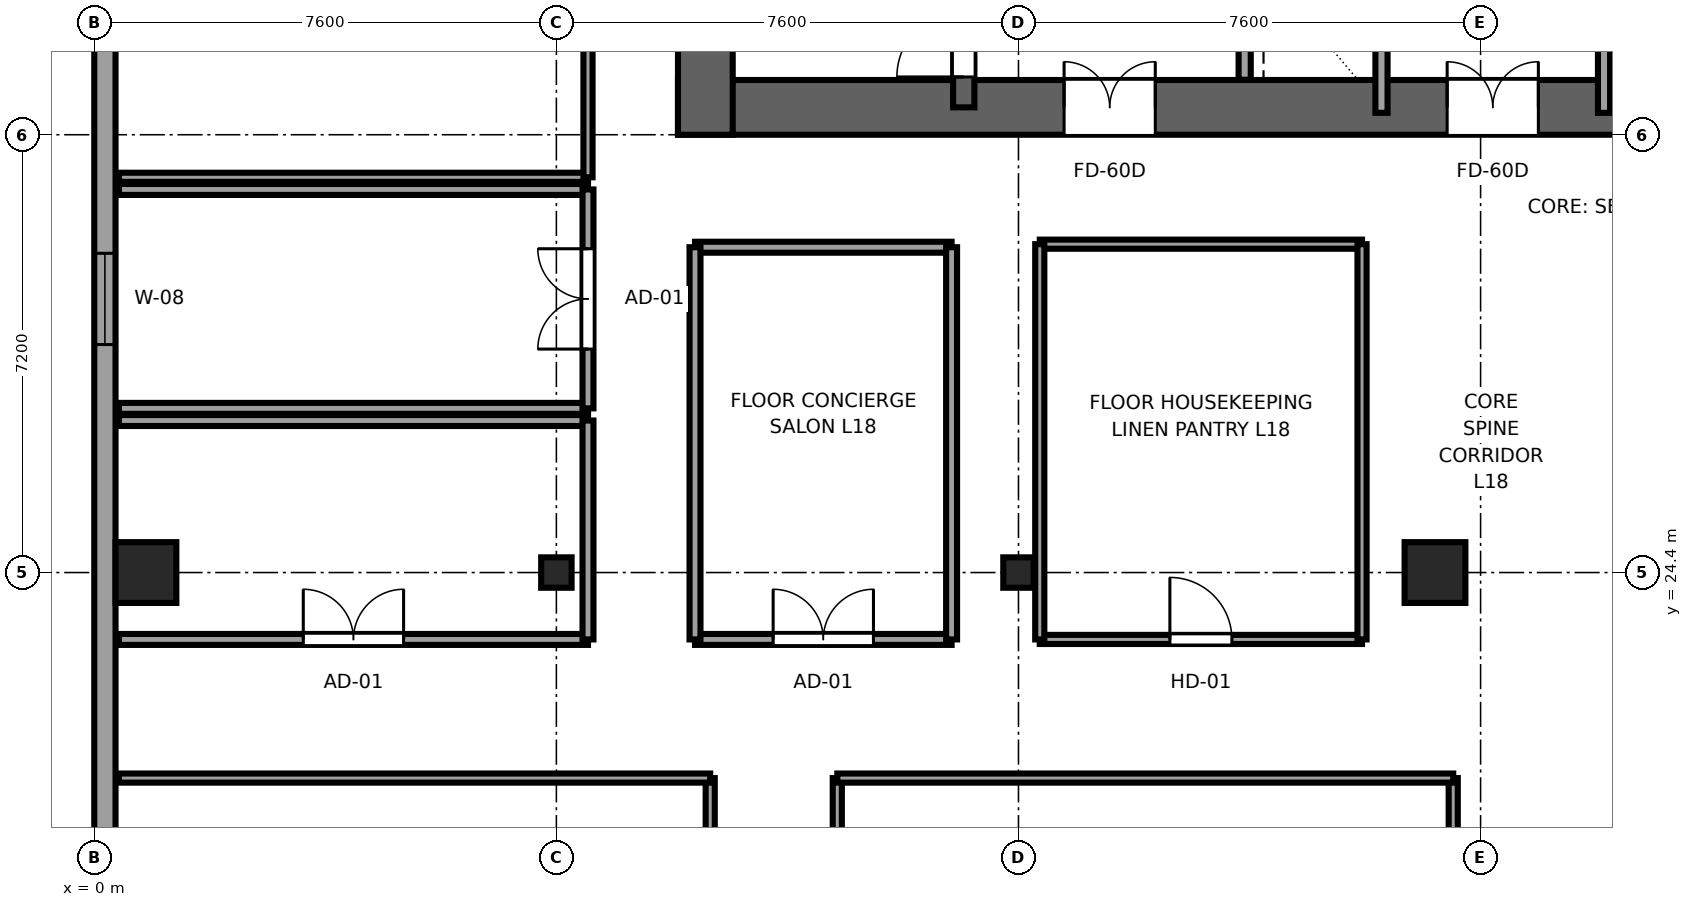
"""IFC4 building model, lengths in metres.
Left out: names, types, materials, properties, quantities, classifications, styles, units other than length and angle.
Written with IfcOpenShell. Run it as: python <this file> out.ifc"""

import sys

from ifc_helpers import new_model, si_unit, direction, frame, frame_2d, origin, origin_2d, place, context, subcontext, project, spatial, rectangle, i_section, extrude, source, transform, mapped, element, fill, save


model = new_model("IFC4")
c1 = context("Model", 3, precision=1e-05, world=origin(), true_north=direction((0.0, 1.0)))
c2 = subcontext(c1, "Body", "Model", "MODEL_VIEW")
j1 = project(units=[si_unit("LENGTHUNIT", "METRE"), si_unit("PLANEANGLEUNIT", "RADIAN")], contexts=[c1])
p1 = place(None, origin())
s1 = spatial("IfcSite", under=j1, at=p1, CompositionType="ELEMENT")
p2 = place(p1, origin())
s2 = spatial("IfcBuilding", under=s1, at=p2, CompositionType="ELEMENT")
p3 = place(p2, frame((0.0, 0.0, 74.6)))
s3 = spatial("IfcBuildingStorey", under=s2, at=p3, CompositionType="ELEMENT", Elevation=74.6)
p4 = place(p3, frame((9.6, 32.05, 0.0), z_axis=(0.0, 0.0, 1.0), x_axis=(1.0, 0.0, 0.0)))
e1 = element("IfcWall", 1, at=p4, inside=s3, PredefinedType="SHEAR", context=c2, shape_type="SweptSolid", body=[
    extrude(rectangle(XDim=26.8, YDim=0.9, at=frame_2d((13.4, 0.0))), origin(), (0.0, 0.0, 1.0), 3.55),
])
p5 = place(p4, frame((7.85, 0.0, 0.0), z_axis=(0.0, 0.0, 1.0), x_axis=(-1.0, 0.0, 0.0)))
e2 = element("IfcOpeningElement", 2, at=p5, cuts=e1, PredefinedType="OPENING", context=c2, shape_type="SweptSolid", body=[
    extrude(rectangle(XDim=1.5, YDim=2.04, at=frame_2d((0.75, 1.02))), frame((0.0, 0.46, 0.0), z_axis=(0.0, -1.0, 0.0), x_axis=(1.0, 0.0, 0.0)), (0.0, 0.0, 1.0), 0.92),
])
p6 = place(p4, frame((14.15, 0.0, 0.0), z_axis=(0.0, 0.0, 1.0), x_axis=(-1.0, 0.0, 0.0)))
e3 = element("IfcOpeningElement", 3, at=p6, cuts=e1, PredefinedType="OPENING", context=c2, shape_type="SweptSolid", body=[
    extrude(rectangle(XDim=1.5, YDim=2.04, at=frame_2d((0.75, 1.02))), frame((0.0, 0.46, 0.0), z_axis=(0.0, -1.0, 0.0), x_axis=(1.0, 0.0, 0.0)), (0.0, 0.0, 1.0), 0.92),
])
p7 = place(p4, frame((20.45, 0.0, 0.0), z_axis=(0.0, 0.0, 1.0), x_axis=(-1.0, 0.0, 0.0)))
e4 = element("IfcOpeningElement", 4, at=p7, cuts=e1, PredefinedType="OPENING", context=c2, shape_type="SweptSolid", body=[
    extrude(rectangle(XDim=1.5, YDim=2.04, at=frame_2d((0.75, 1.02))), frame((0.0, 0.46, 0.0), z_axis=(0.0, -1.0, 0.0), x_axis=(1.0, 0.0, 0.0)), (0.0, 0.0, 1.0), 0.92),
])
p8 = place(p3, frame((10.05, 31.6, 0.0), z_axis=(0.0, 0.0, 1.0), x_axis=(0.0, 1.0, 0.0)))
e5 = element("IfcWall", 5, at=p8, inside=s3, PredefinedType="SHEAR", context=c2, shape_type="SweptSolid", body=[
    extrude(rectangle(XDim=13.6, YDim=0.9, at=frame_2d((6.8, 0.0))), origin(), (0.0, 0.0, 1.0), 3.55),
])
p9 = place(p3, frame((14.3, 32.05, 0.0), z_axis=(0.0, 0.0, 1.0), x_axis=(0.0, 1.0, 0.0)))
e6 = element("IfcWall", 6, at=p9, inside=s3, PredefinedType="SHEAR", context=c2, shape_type="SweptSolid", body=[
    extrude(rectangle(XDim=12.7, YDim=0.35, at=frame_2d((6.35, 0.0))), origin(), (0.0, 0.0, 1.0), 3.55),
])
p10 = place(p9, frame((0.5, 0.0, 0.0)))
e7 = element("IfcOpeningElement", 7, at=p10, cuts=e6, PredefinedType="OPENING", context=c2, shape_type="SweptSolid", body=[
    extrude(rectangle(XDim=1.1, YDim=2.12, at=frame_2d((0.55, 1.06))), frame((0.0, 0.185, 0.0), z_axis=(0.0, -1.0, 0.0), x_axis=(1.0, 0.0, 0.0)), (0.0, 0.0, 1.0), 0.37),
])
m1 = source(origin(), c2, "Body", "SweptSolid", [
    extrude(rectangle(XDim=1.0, YDim=1.0, at=origin_2d()), origin(), (0.0, 0.0, 1.0), 3.55),
])
p11 = place(p3, frame((0.85, 24.4, 0.0), z_axis=(0.0, 0.0, 1.0), x_axis=(1.0, 0.0, 0.0)))
e8 = element("IfcColumn", 8, at=p11, inside=s3, PredefinedType="COLUMN", context=c2, shape_type="MappedRepresentation", body=[
    mapped(m1, transform((0.0, 0.0, 0.0), x_axis=(1.0, 0.0, 0.0), y_axis=(0.0, 1.0, 0.0), z_axis=(0.0, 0.0, 1.0), scale=1.0)),
])
m2 = source(origin(), c2, "Body", "SweptSolid", [
    extrude(i_section(OverallWidth=0.5, OverallDepth=0.5, WebThickness=0.028, FlangeThickness=0.045, at=origin_2d()), origin(), (0.0, 0.0, 1.0), 3.55),
])
for number, where, z_axis, x_axis in (
    (9, (7.6, 24.4, 0.0), (0.0, 0.0, 1.0), (1.0, 0.0, 0.0)),
    (10, (15.2, 24.4, 0.0), (0.0, 0.0, 1.0), (1.0, 0.0, 0.0)),
):
    element("IfcColumn", number, at=place(p3, frame(where, z_axis=z_axis, x_axis=x_axis)), inside=s3, PredefinedType="COLUMN", context=c2, shape_type="MappedRepresentation", body=[
        mapped(m2, transform((0.0, 0.0, 0.0), x_axis=(1.0, 0.0, 0.0), y_axis=(0.0, 1.0, 0.0), z_axis=(0.0, 0.0, 1.0), scale=1.0)),
    ])
p12 = place(p3, frame((22.05, 24.4, 0.0), z_axis=(0.0, 0.0, 1.0), x_axis=(1.0, 0.0, 0.0)))
e11 = element("IfcColumn", 11, at=p12, inside=s3, PredefinedType="COLUMN", context=c2, shape_type="MappedRepresentation", body=[
    mapped(m1, transform((0.0, 0.0, 0.0), x_axis=(1.0, 0.0, 0.0), y_axis=(0.0, 1.0, 0.0), z_axis=(0.0, 0.0, 1.0), scale=1.0)),
])
p13 = place(p3, frame((0.175, 41.383, 0.0), z_axis=(0.0, 0.0, 1.0), x_axis=(0.0, -1.0, 0.0)))
e12 = element("IfcWall", 12, at=p13, inside=s3, PredefinedType="SOLIDWALL", context=c2, shape_type="SweptSolid", body=[
    extrude(rectangle(XDim=36.766, YDim=0.35, at=frame_2d((18.383, 0.0))), origin(), (0.0, 0.0, 1.0), 3.37),
])
p14 = place(p13, frame((1.526, 0.0, 0.68)))
e13 = element("IfcOpeningElement", 13, at=p14, cuts=e12, PredefinedType="OPENING", context=c2, shape_type="SweptSolid", body=[
    extrude(rectangle(XDim=2.1, YDim=1.9, at=frame_2d((1.05, 0.95))), frame((0.0, 0.185, 0.0), z_axis=(0.0, -1.0, 0.0), x_axis=(1.0, 0.0, 0.0)), (0.0, 0.0, 1.0), 0.37),
])
p15 = place(p13, frame((4.428, 0.0, 0.68)))
e14 = element("IfcOpeningElement", 14, at=p15, cuts=e12, PredefinedType="OPENING", context=c2, shape_type="SweptSolid", body=[
    extrude(rectangle(XDim=2.1, YDim=1.9, at=frame_2d((1.05, 0.95))), frame((0.0, 0.185, 0.0), z_axis=(0.0, -1.0, 0.0), x_axis=(1.0, 0.0, 0.0)), (0.0, 0.0, 1.0), 0.37),
])
p16 = place(p13, frame((21.285, 0.0, 0.68)))
e15 = element("IfcOpeningElement", 15, at=p16, cuts=e12, PredefinedType="OPENING", context=c2, shape_type="SweptSolid", body=[
    extrude(rectangle(XDim=2.1, YDim=1.9, at=frame_2d((1.05, 0.95))), frame((0.0, 0.185, 0.0), z_axis=(0.0, -1.0, 0.0), x_axis=(1.0, 0.0, 0.0)), (0.0, 0.0, 1.0), 0.37),
])
p17 = place(p13, frame((26.286, 0.0, 0.68)))
e16 = element("IfcOpeningElement", 16, at=p17, cuts=e12, PredefinedType="OPENING", context=c2, shape_type="SweptSolid", body=[
    extrude(rectangle(XDim=2.1, YDim=1.9, at=frame_2d((1.05, 0.95))), frame((0.0, 0.185, 0.0), z_axis=(0.0, -1.0, 0.0), x_axis=(1.0, 0.0, 0.0)), (0.0, 0.0, 1.0), 0.37),
])
p18 = place(p13, frame((30.993, 0.0, 0.62)))
e17 = element("IfcOpeningElement", 17, at=p18, cuts=e12, PredefinedType="OPENING", context=c2, shape_type="SweptSolid", body=[
    extrude(rectangle(XDim=1.5, YDim=1.55, at=frame_2d((0.75, 0.775))), frame((0.0, 0.185, 0.0), z_axis=(0.0, -1.0, 0.0), x_axis=(1.0, 0.0, 0.0)), (0.0, 0.0, 1.0), 0.37),
])
p19 = place(p13, frame((11.733, 0.0, 0.62)))
e18 = element("IfcOpeningElement", 18, at=p19, cuts=e12, PredefinedType="OPENING", context=c2, shape_type="SweptSolid", body=[
    extrude(rectangle(XDim=1.5, YDim=1.55, at=frame_2d((0.75, 0.775))), frame((0.0, 0.185, 0.0), z_axis=(0.0, -1.0, 0.0), x_axis=(1.0, 0.0, 0.0)), (0.0, 0.0, 1.0), 0.37),
])
p20 = place(p3, frame((18.92, 32.504, 0.0), z_axis=(0.0, 0.0, 1.0), x_axis=(0.0, 1.0, 0.0)))
e19 = element("IfcWall", 19, at=p20, inside=s3, PredefinedType="SOLIDWALL", context=c2, shape_type="SweptSolid", body=[
    extrude(rectangle(XDim=3.646, YDim=0.2, at=frame_2d((1.823, 0.0))), origin(), (0.0, 0.0, 1.0), 3.37),
])
for number, where, z_axis, x_axis in (
    (20, (21.17, 31.96, 0.0), (0.0, 0.0, 1.0), (0.0, 1.0, 0.0)),
    (21, (24.83, 31.96, 0.0), (0.0, 0.0, 1.0), (0.0, 1.0, 0.0)),
):
    element("IfcWall", number, at=place(p3, frame(where, z_axis=z_axis, x_axis=x_axis)), inside=s3, PredefinedType="SOLIDWALL", context=c2, shape_type="SweptSolid", body=[
        extrude(rectangle(XDim=12.58, YDim=0.2, at=frame_2d((6.29, 0.0))), origin(), (0.0, 0.0, 1.0), 3.37),
    ])
p21 = place(p3, frame((10.13, 18.21, 0.0), z_axis=(0.0, 0.0, 1.0), x_axis=(0.0, 1.0, 0.0)))
e22 = element("IfcWall", 22, at=p21, inside=s3, PredefinedType="PARTITIONING", context=c2, shape_type="SweptSolid", body=[
    extrude(rectangle(XDim=2.81, YDim=0.15, at=frame_2d((1.405, 0.0))), origin(), (0.0, 0.0, 1.0), 3.37),
])
p22 = place(p21, frame((0.895, 0.0, 0.0)))
e23 = element("IfcOpeningElement", 23, at=p22, cuts=e22, PredefinedType="OPENING", context=c2, shape_type="SweptSolid", body=[
    extrude(rectangle(XDim=0.98, YDim=2.12, at=frame_2d((0.49, 1.06))), frame((0.0, 0.085, 0.0), z_axis=(0.0, -1.0, 0.0), x_axis=(1.0, 0.0, 0.0)), (0.0, 0.0, 1.0), 0.17),
])
p23 = place(p3, frame((0.405, 21.02, 0.0), z_axis=(0.0, 0.0, 1.0), x_axis=(1.0, 0.0, 0.0)))
e24 = element("IfcWall", 24, at=p23, inside=s3, PredefinedType="PARTITIONING", context=c2, shape_type="SweptSolid", body=[
    extrude(rectangle(XDim=9.725, YDim=0.15, at=frame_2d((4.862, 0.0))), origin(), (0.0, 0.0, 1.0), 3.37),
])
p24 = place(p3, frame((12.22, 17.01, 0.0), z_axis=(0.0, 0.0, 1.0), x_axis=(0.0, 1.0, 0.0)))
e25 = element("IfcWall", 25, at=p24, inside=s3, PredefinedType="PARTITIONING", context=c2, shape_type="SweptSolid", body=[
    extrude(rectangle(XDim=4.01, YDim=0.15, at=frame_2d((2.005, 0.0))), origin(), (0.0, 0.0, 1.0), 3.37),
])
p25 = place(p24, frame((1.495, 0.0, 0.0)))
e26 = element("IfcOpeningElement", 26, at=p25, cuts=e25, PredefinedType="OPENING", context=c2, shape_type="SweptSolid", body=[
    extrude(rectangle(XDim=0.98, YDim=2.12, at=frame_2d((0.49, 1.06))), frame((0.0, 0.085, 0.0), z_axis=(0.0, -1.0, 0.0), x_axis=(1.0, 0.0, 0.0)), (0.0, 0.0, 1.0), 0.17),
])
p26 = place(p3, frame((22.35, 14.68, 0.0), z_axis=(0.0, 0.0, 1.0), x_axis=(0.0, 1.0, 0.0)))
e27 = element("IfcWall", 27, at=p26, inside=s3, PredefinedType="PARTITIONING", context=c2, shape_type="SweptSolid", body=[
    extrude(rectangle(XDim=6.34, YDim=0.15, at=frame_2d((3.17, 0.0))), origin(), (0.0, 0.0, 1.0), 3.37),
])
p27 = place(p3, frame((12.22, 21.02, 0.0), z_axis=(0.0, 0.0, 1.0), x_axis=(1.0, 0.0, 0.0)))
e28 = element("IfcWall", 28, at=p27, inside=s3, PredefinedType="PARTITIONING", context=c2, shape_type="SweptSolid", body=[
    extrude(rectangle(XDim=10.13, YDim=0.15, at=frame_2d((5.065, 0.0))), origin(), (0.0, 0.0, 1.0), 3.37),
])
p28 = place(p3, frame((0.405, 23.3, 0.0), z_axis=(0.0, 0.0, 1.0), x_axis=(1.0, 0.0, 0.0)))
e29 = element("IfcWall", 29, at=p28, inside=s3, PredefinedType="PARTITIONING", context=c2, shape_type="SweptSolid", body=[
    extrude(rectangle(XDim=7.715, YDim=0.18, at=frame_2d((3.857, 0.0))), origin(), (0.0, 0.0, 1.0), 3.37),
])
p29 = place(p28, frame((3.032, 0.0, 0.0)))
e30 = element("IfcOpeningElement", 30, at=p29, cuts=e29, PredefinedType="OPENING", context=c2, shape_type="SweptSolid", body=[
    extrude(rectangle(XDim=1.65, YDim=2.15, at=frame_2d((0.825, 1.075))), frame((0.0, 0.1, 0.0), z_axis=(0.0, -1.0, 0.0), x_axis=(1.0, 0.0, 0.0)), (0.0, 0.0, 1.0), 0.2),
])
p30 = place(p3, frame((0.405, 26.9, 0.0), z_axis=(0.0, 0.0, 1.0), x_axis=(1.0, 0.0, 0.0)))
e31 = element("IfcWall", 31, at=p30, inside=s3, PredefinedType="PARTITIONING", context=c2, shape_type="SweptSolid", body=[
    extrude(rectangle(XDim=7.715, YDim=0.18, at=frame_2d((3.857, 0.0))), origin(), (0.0, 0.0, 1.0), 3.37),
])
p31 = place(p3, frame((8.12, 23.3, 0.0), z_axis=(0.0, 0.0, 1.0), x_axis=(0.0, 1.0, 0.0)))
e32 = element("IfcWall", 32, at=p31, inside=s3, PredefinedType="PARTITIONING", context=c2, shape_type="SweptSolid", body=[
    extrude(rectangle(XDim=3.6, YDim=0.18, at=frame_2d((1.8, 0.0))), origin(), (0.0, 0.0, 1.0), 3.37),
])
for number, where, z_axis, x_axis in (
    (33, (0.405, 27.1, 0.0), (0.0, 0.0, 1.0), (1.0, 0.0, 0.0)),
    (34, (0.405, 30.7, 0.0), (0.0, 0.0, 1.0), (1.0, 0.0, 0.0)),
):
    element("IfcWall", number, at=place(p3, frame(where, z_axis=z_axis, x_axis=x_axis)), inside=s3, PredefinedType="PARTITIONING", context=c2, shape_type="SweptSolid", body=[
        extrude(rectangle(XDim=7.715, YDim=0.18, at=frame_2d((3.857, 0.0))), origin(), (0.0, 0.0, 1.0), 3.37),
    ])
p32 = place(p3, frame((8.12, 27.1, 0.0), z_axis=(0.0, 0.0, 1.0), x_axis=(0.0, 1.0, 0.0)))
e35 = element("IfcWall", 35, at=p32, inside=s3, PredefinedType="PARTITIONING", context=c2, shape_type="SweptSolid", body=[
    extrude(rectangle(XDim=3.6, YDim=0.18, at=frame_2d((1.8, 0.0))), origin(), (0.0, 0.0, 1.0), 3.37),
])
p33 = place(p32, frame((0.975, 0.0, 0.0)))
e36 = element("IfcOpeningElement", 36, at=p33, cuts=e35, PredefinedType="OPENING", context=c2, shape_type="SweptSolid", body=[
    extrude(rectangle(XDim=1.65, YDim=2.15, at=frame_2d((0.825, 1.075))), frame((0.0, 0.1, 0.0), z_axis=(0.0, -1.0, 0.0), x_axis=(1.0, 0.0, 0.0)), (0.0, 0.0, 1.0), 0.2),
])
p34 = place(p3, frame((0.405, 30.9, 0.0), z_axis=(0.0, 0.0, 1.0), x_axis=(1.0, 0.0, 0.0)))
e37 = element("IfcWall", 37, at=p34, inside=s3, PredefinedType="PARTITIONING", context=c2, shape_type="SweptSolid", body=[
    extrude(rectangle(XDim=7.715, YDim=0.15, at=frame_2d((3.857, 0.0))), origin(), (0.0, 0.0, 1.0), 3.37),
])
p35 = place(p3, frame((8.12, 30.9, 0.0), z_axis=(0.0, 0.0, 1.0), x_axis=(0.0, 1.0, 0.0)))
e38 = element("IfcWall", 38, at=p35, inside=s3, PredefinedType="PARTITIONING", context=c2, shape_type="SweptSolid", body=[
    extrude(rectangle(XDim=14.695, YDim=0.15, at=frame_2d((7.348, 0.0))), origin(), (0.0, 0.0, 1.0), 3.37),
])
p36 = place(p35, frame((6.522, 0.0, 0.0)))
e39 = element("IfcOpeningElement", 39, at=p36, cuts=e38, PredefinedType="OPENING", context=c2, shape_type="SweptSolid", body=[
    extrude(rectangle(XDim=1.65, YDim=2.15, at=frame_2d((0.825, 1.075))), frame((0.0, 0.085, 0.0), z_axis=(0.0, -1.0, 0.0), x_axis=(1.0, 0.0, 0.0)), (0.0, 0.0, 1.0), 0.17),
])
p37 = place(p3, frame((9.88, 23.3, 0.0), z_axis=(0.0, 0.0, 1.0), x_axis=(1.0, 0.0, 0.0)))
e40 = element("IfcWall", 40, at=p37, inside=s3, PredefinedType="PARTITIONING", context=c2, shape_type="SweptSolid", body=[
    extrude(rectangle(XDim=4.22, YDim=0.18, at=frame_2d((2.11, 0.0))), origin(), (0.0, 0.0, 1.0), 3.37),
])
p38 = place(p37, frame((1.285, 0.0, 0.0)))
e41 = element("IfcOpeningElement", 41, at=p38, cuts=e40, PredefinedType="OPENING", context=c2, shape_type="SweptSolid", body=[
    extrude(rectangle(XDim=1.65, YDim=2.15, at=frame_2d((0.825, 1.075))), frame((0.0, 0.1, 0.0), z_axis=(0.0, -1.0, 0.0), x_axis=(1.0, 0.0, 0.0)), (0.0, 0.0, 1.0), 0.2),
])
p39 = place(p3, frame((9.88, 29.75, 0.0), z_axis=(0.0, 0.0, 1.0), x_axis=(1.0, 0.0, 0.0)))
e42 = element("IfcWall", 42, at=p39, inside=s3, PredefinedType="PARTITIONING", context=c2, shape_type="SweptSolid", body=[
    extrude(rectangle(XDim=4.22, YDim=0.18, at=frame_2d((2.11, 0.0))), origin(), (0.0, 0.0, 1.0), 3.37),
])
for number, where, z_axis, x_axis in (
    (43, (9.88, 23.3, 0.0), (0.0, 0.0, 1.0), (0.0, 1.0, 0.0)),
    (44, (14.1, 23.3, 0.0), (0.0, 0.0, 1.0), (0.0, 1.0, 0.0)),
):
    element("IfcWall", number, at=place(p3, frame(where, z_axis=z_axis, x_axis=x_axis)), inside=s3, PredefinedType="PARTITIONING", context=c2, shape_type="SweptSolid", body=[
        extrude(rectangle(XDim=6.45, YDim=0.18, at=frame_2d((3.225, 0.0))), origin(), (0.0, 0.0, 1.0), 3.37),
    ])
p40 = place(p3, frame((15.55, 23.3, 0.0), z_axis=(0.0, 0.0, 1.0), x_axis=(1.0, 0.0, 0.0)))
e45 = element("IfcWall", 45, at=p40, inside=s3, PredefinedType="PARTITIONING", context=c2, shape_type="SweptSolid", body=[
    extrude(rectangle(XDim=5.3, YDim=0.15, at=frame_2d((2.65, 0.0))), origin(), (0.0, 0.0, 1.0), 3.37),
])
p41 = place(p40, frame((2.14, 0.0, 0.0)))
e46 = element("IfcOpeningElement", 46, at=p41, cuts=e45, PredefinedType="OPENING", context=c2, shape_type="SweptSolid", body=[
    extrude(rectangle(XDim=1.02, YDim=2.03, at=frame_2d((0.51, 1.015))), frame((0.0, 0.085, 0.0), z_axis=(0.0, -1.0, 0.0), x_axis=(1.0, 0.0, 0.0)), (0.0, 0.0, 1.0), 0.17),
])
p42 = place(p3, frame((15.55, 29.8, 0.0), z_axis=(0.0, 0.0, 1.0), x_axis=(1.0, 0.0, 0.0)))
e47 = element("IfcWall", 47, at=p42, inside=s3, PredefinedType="PARTITIONING", context=c2, shape_type="SweptSolid", body=[
    extrude(rectangle(XDim=5.3, YDim=0.15, at=frame_2d((2.65, 0.0))), origin(), (0.0, 0.0, 1.0), 3.37),
])
for number, where, z_axis, x_axis in (
    (48, (15.55, 23.3, 0.0), (0.0, 0.0, 1.0), (0.0, 1.0, 0.0)),
    (49, (20.85, 23.3, 0.0), (0.0, 0.0, 1.0), (0.0, 1.0, 0.0)),
):
    element("IfcWall", number, at=place(p3, frame(where, z_axis=z_axis, x_axis=x_axis)), inside=s3, PredefinedType="PARTITIONING", context=c2, shape_type="SweptSolid", body=[
        extrude(rectangle(XDim=6.5, YDim=0.15, at=frame_2d((3.25, 0.0))), origin(), (0.0, 0.0, 1.0), 3.37),
    ])
m3 = source(origin(), c2, "Body", "SweptSolid", [
    extrude(rectangle(XDim=1.5, YDim=1.55, at=frame_2d((0.75, 0.775))), frame((0.0, 0.09, 0.0), z_axis=(0.0, -1.0, 0.0), x_axis=(1.0, 0.0, 0.0)), (0.0, 0.0, 1.0), 0.06),
])
p43 = place(p19, origin())
e50 = element("IfcWindow", 50, at=p43, inside=s3, PartitioningType="SINGLE_PANEL", PredefinedType="WINDOW", context=c2, shape_type="MappedRepresentation", body=[
    mapped(m3, transform((0.0, 0.0, 0.0), x_axis=(1.0, 0.0, 0.0), y_axis=(0.0, 1.0, 0.0), z_axis=(0.0, 0.0, 1.0), scale=1.0)),
])
fill(e18, e50)
m4 = source(origin(), c2, "Body", "SweptSolid", [
    extrude(rectangle(XDim=1.1, YDim=2.12, at=frame_2d((0.55, 1.06))), frame((0.0, 0.025, 0.0), z_axis=(0.0, -1.0, 0.0), x_axis=(1.0, 0.0, 0.0)), (0.0, 0.0, 1.0), 0.05),
])
p44 = place(p10, origin())
e51 = element("IfcDoor", 51, at=p44, inside=s3, OperationType="SINGLE_SWING_LEFT", PredefinedType="DOOR", context=c2, shape_type="MappedRepresentation", body=[
    mapped(m4, transform((0.0, 0.0, 0.0), x_axis=(1.0, 0.0, 0.0), y_axis=(0.0, 1.0, 0.0), z_axis=(0.0, 0.0, 1.0), scale=1.0)),
])
fill(e7, e51)
m5 = source(origin(), c2, "Body", "SweptSolid", [
    extrude(rectangle(XDim=1.5, YDim=2.04, at=frame_2d((0.75, 1.02))), frame((0.0, 0.025, 0.0), z_axis=(0.0, -1.0, 0.0), x_axis=(1.0, 0.0, 0.0)), (0.0, 0.0, 1.0), 0.05),
])
p45 = place(p5, origin())
e52 = element("IfcDoor", 52, at=p45, inside=s3, OperationType="DOUBLE_DOOR_SINGLE_SWING", PredefinedType="DOOR", context=c2, shape_type="MappedRepresentation", body=[
    mapped(m5, transform((0.0, 0.0, 0.0), x_axis=(1.0, 0.0, 0.0), y_axis=(0.0, 1.0, 0.0), z_axis=(0.0, 0.0, 1.0), scale=1.0)),
])
fill(e2, e52)
p46 = place(p6, origin())
e53 = element("IfcDoor", 53, at=p46, inside=s3, OperationType="DOUBLE_DOOR_SINGLE_SWING", PredefinedType="DOOR", context=c2, shape_type="MappedRepresentation", body=[
    mapped(m5, transform((0.0, 0.0, 0.0), x_axis=(1.0, 0.0, 0.0), y_axis=(0.0, 1.0, 0.0), z_axis=(0.0, 0.0, 1.0), scale=1.0)),
])
fill(e3, e53)
m6 = source(origin(), c2, "Body", "SweptSolid", [
    extrude(rectangle(XDim=1.65, YDim=2.15, at=frame_2d((0.825, 1.075))), frame((0.0, 0.025, 0.0), z_axis=(0.0, -1.0, 0.0), x_axis=(1.0, 0.0, 0.0)), (0.0, 0.0, 1.0), 0.05),
])
p47 = place(p29, origin())
e54 = element("IfcDoor", 54, at=p47, inside=s3, OperationType="DOUBLE_DOOR_SINGLE_SWING", PredefinedType="DOOR", context=c2, shape_type="MappedRepresentation", body=[
    mapped(m6, transform((0.0, 0.0, 0.0), x_axis=(1.0, 0.0, 0.0), y_axis=(0.0, 1.0, 0.0), z_axis=(0.0, 0.0, 1.0), scale=1.0)),
])
fill(e30, e54)
p48 = place(p33, origin())
e55 = element("IfcDoor", 55, at=p48, inside=s3, OperationType="DOUBLE_DOOR_SINGLE_SWING", PredefinedType="DOOR", context=c2, shape_type="MappedRepresentation", body=[
    mapped(m6, transform((0.0, 0.0, 0.0), x_axis=(1.0, 0.0, 0.0), y_axis=(0.0, 1.0, 0.0), z_axis=(0.0, 0.0, 1.0), scale=1.0)),
])
fill(e36, e55)
p49 = place(p38, origin())
e56 = element("IfcDoor", 56, at=p49, inside=s3, OperationType="DOUBLE_DOOR_SINGLE_SWING", PredefinedType="DOOR", context=c2, shape_type="MappedRepresentation", body=[
    mapped(m6, transform((0.0, 0.0, 0.0), x_axis=(1.0, 0.0, 0.0), y_axis=(0.0, 1.0, 0.0), z_axis=(0.0, 0.0, 1.0), scale=1.0)),
])
fill(e41, e56)
m7 = source(origin(), c2, "Body", "SweptSolid", [
    extrude(rectangle(XDim=1.02, YDim=2.03, at=frame_2d((0.51, 1.015))), frame((0.0, 0.025, 0.0), z_axis=(0.0, -1.0, 0.0), x_axis=(1.0, 0.0, 0.0)), (0.0, 0.0, 1.0), 0.05),
])
p50 = place(p41, origin())
e57 = element("IfcDoor", 57, at=p50, inside=s3, OperationType="SINGLE_SWING_LEFT", PredefinedType="DOOR", context=c2, shape_type="MappedRepresentation", body=[
    mapped(m7, transform((0.0, 0.0, 0.0), x_axis=(1.0, 0.0, 0.0), y_axis=(0.0, 1.0, 0.0), z_axis=(0.0, 0.0, 1.0), scale=1.0)),
])
fill(e46, e57)
save(model, sys.argv[1])
